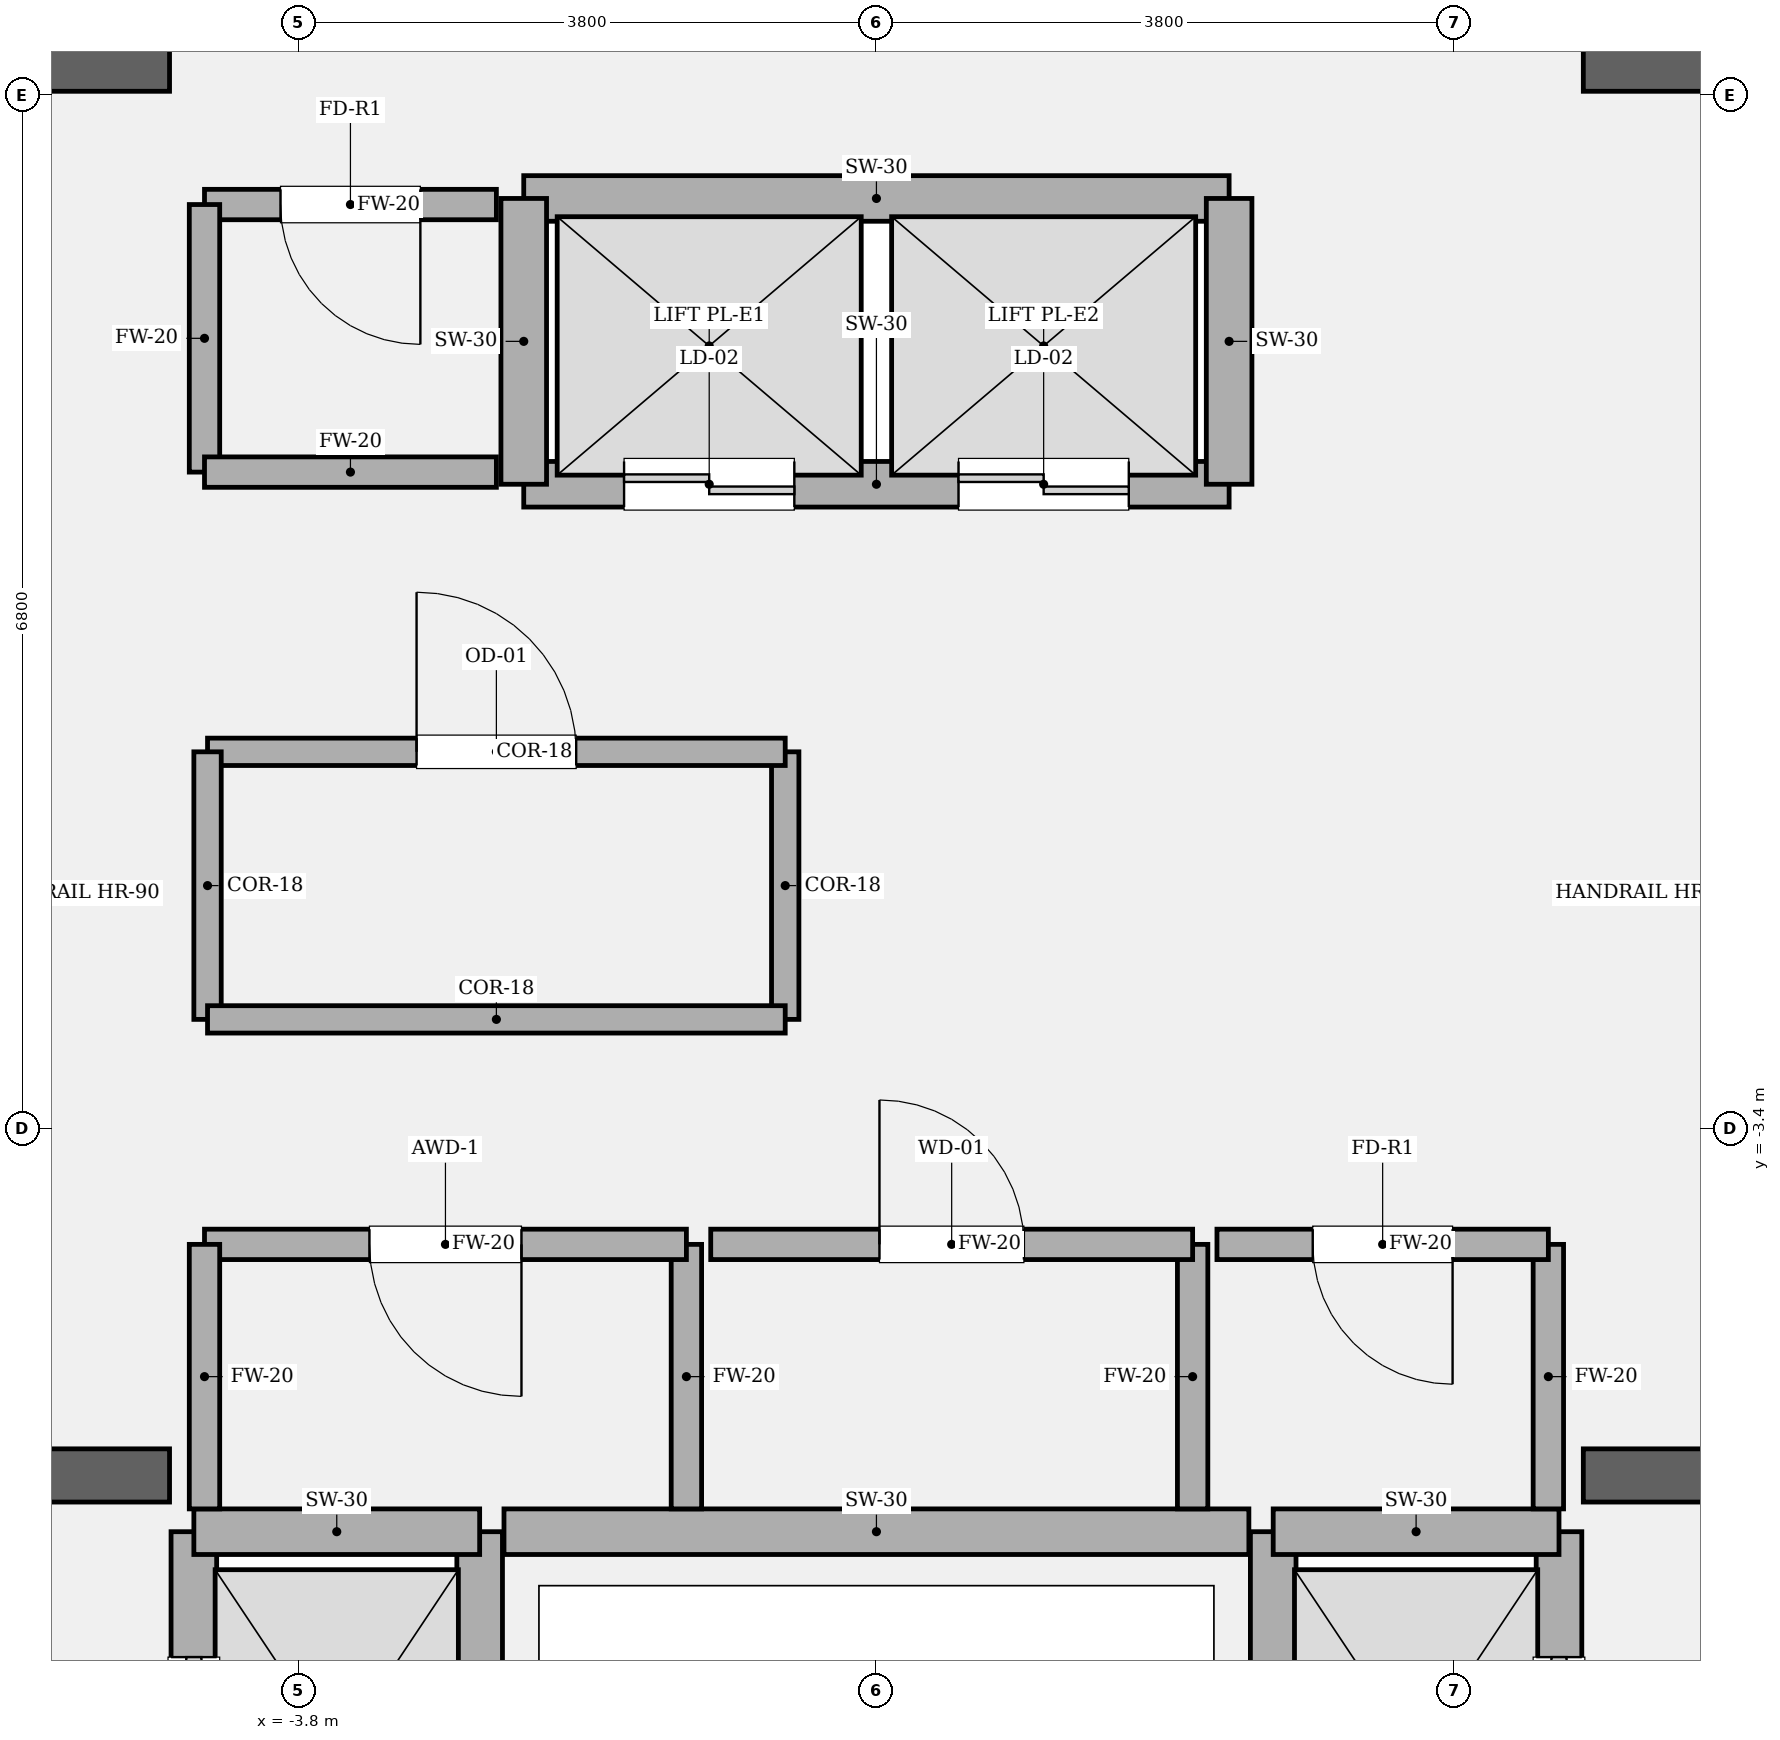
"""IFC4 building model, lengths in metres.
Left out: names, types, materials, properties, quantities, classifications, styles, units other than length and angle.
Written with IfcOpenShell. Run it as: python <this file> out.ifc"""

import sys

from ifc_helpers import new_model, si_unit, direction, frame, frame_2d, origin, place, context, subcontext, project, spatial, rectangle, extrude, element, fill, save


model = new_model("IFC4")
c1 = context("Model", 3, precision=1e-05, world=origin(), true_north=direction((0.0, 1.0)))
c2 = subcontext(c1, "Body", "Model", "MODEL_VIEW")
j1 = project(units=[si_unit("LENGTHUNIT", "METRE"), si_unit("PLANEANGLEUNIT", "RADIAN")], contexts=[c1])
p1 = place(None, origin())
s1 = spatial("IfcSite", under=j1, at=p1, CompositionType="ELEMENT")
p2 = place(p1, origin())
s2 = spatial("IfcBuilding", under=s1, at=p2, CompositionType="ELEMENT")
p3 = place(p2, frame((0.0, 0.0, 292.2)))
s3 = spatial("IfcBuildingStorey", under=s2, at=p3, CompositionType="ELEMENT", Elevation=292.2)
p4 = place(p3, frame((-9.925, -5.68, 0.0), z_axis=(0.0, 0.0, 1.0), x_axis=(1.0, 0.0, 0.0)))
e1 = element("IfcWall", 1, at=p4, inside=s3, PredefinedType="SOLIDWALL", context=c2, shape_type="SweptSolid", body=[
    extrude(rectangle(XDim=5.275, YDim=0.35, at=frame_2d((2.638, 0.0))), origin(), (0.0, 0.0, 1.0), 4.2),
])
p5 = place(p4, frame((1.385, 0.0, 0.0)))
e2 = element("IfcOpeningElement", 2, at=p5, cuts=e1, PredefinedType="OPENING", context=c2, shape_type="SweptSolid", body=[
    extrude(rectangle(XDim=1.18, YDim=2.2, at=frame_2d((0.59, 1.1))), frame((0.0, 0.185, 0.0), z_axis=(0.0, -1.0, 0.0), x_axis=(1.0, 0.0, 0.0)), (0.0, 0.0, 1.0), 0.37),
])
p6 = place(p3, frame((4.65, -5.68, 0.0), z_axis=(0.0, 0.0, 1.0), x_axis=(1.0, 0.0, 0.0)))
e3 = element("IfcWall", 3, at=p6, inside=s3, PredefinedType="SOLIDWALL", context=c2, shape_type="SweptSolid", body=[
    extrude(rectangle(XDim=5.275, YDim=0.35, at=frame_2d((2.638, 0.0))), origin(), (0.0, 0.0, 1.0), 4.2),
])
p7 = place(p6, frame((2.71, 0.0, 0.0)))
e4 = element("IfcOpeningElement", 4, at=p7, cuts=e3, PredefinedType="OPENING", context=c2, shape_type="SweptSolid", body=[
    extrude(rectangle(XDim=1.18, YDim=2.2, at=frame_2d((0.59, 1.1))), frame((0.0, 0.185, 0.0), z_axis=(0.0, -1.0, 0.0), x_axis=(1.0, 0.0, 0.0)), (0.0, 0.0, 1.0), 0.37),
])
for number, where, z_axis, x_axis in (
    (5, (-9.925, 3.6, 0.0), (0.0, 0.0, 1.0), (1.0, 0.0, 0.0)),
    (6, (4.65, 3.6, 0.0), (0.0, 0.0, 1.0), (1.0, 0.0, 0.0)),
):
    element("IfcWall", number, at=place(p3, frame(where, z_axis=z_axis, x_axis=x_axis)), inside=s3, PredefinedType="SOLIDWALL", context=c2, shape_type="SweptSolid", body=[
        extrude(rectangle(XDim=5.275, YDim=0.35, at=frame_2d((2.638, 0.0))), origin(), (0.0, 0.0, 1.0), 4.2),
    ])
p8 = place(p3, frame((-4.49, -8.82, 0.0), z_axis=(0.0, 0.0, 1.0), x_axis=(0.0, 1.0, 0.0)))
e7 = element("IfcWall", 7, at=p8, inside=s3, PredefinedType="SOLIDWALL", context=c2, shape_type="SweptSolid", body=[
    extrude(rectangle(XDim=2.77, YDim=0.3, at=frame_2d((1.385, 0.0))), origin(), (0.0, 0.0, 1.0), 4.0),
])
p9 = place(p8, frame((0.825, 0.0, 0.0)))
e8 = element("IfcOpeningElement", 8, at=p9, cuts=e7, PredefinedType="OPENING", context=c2, shape_type="SweptSolid", body=[
    extrude(rectangle(XDim=1.12, YDim=2.25, at=frame_2d((0.56, 1.125))), frame((0.0, 0.16, 0.0), z_axis=(0.0, -1.0, 0.0), x_axis=(1.0, 0.0, 0.0)), (0.0, 0.0, 1.0), 0.32),
])
p10 = place(p3, frame((-2.61, -8.82, 0.0), z_axis=(0.0, 0.0, 1.0), x_axis=(0.0, 1.0, 0.0)))
e9 = element("IfcWall", 9, at=p10, inside=s3, PredefinedType="SOLIDWALL", context=c2, shape_type="SweptSolid", body=[
    extrude(rectangle(XDim=2.77, YDim=0.3, at=frame_2d((1.385, 0.0))), origin(), (0.0, 0.0, 1.0), 4.0),
])
p11 = place(p3, frame((-4.49, -6.05, 0.0), z_axis=(0.0, 0.0, 1.0), x_axis=(1.0, 0.0, 0.0)))
e10 = element("IfcWall", 10, at=p11, inside=s3, PredefinedType="SOLIDWALL", context=c2, shape_type="SweptSolid", body=[
    extrude(rectangle(XDim=1.88, YDim=0.3, at=frame_2d((0.94, 0.0))), origin(), (0.0, 0.0, 1.0), 4.0),
])
p12 = place(p3, frame((4.49, -8.82, 0.0), z_axis=(0.0, 0.0, 1.0), x_axis=(0.0, 1.0, 0.0)))
e11 = element("IfcWall", 11, at=p12, inside=s3, PredefinedType="SOLIDWALL", context=c2, shape_type="SweptSolid", body=[
    extrude(rectangle(XDim=2.77, YDim=0.3, at=frame_2d((1.385, 0.0))), origin(), (0.0, 0.0, 1.0), 4.0),
])
p13 = place(p12, frame((0.825, 0.0, 0.0)))
e12 = element("IfcOpeningElement", 12, at=p13, cuts=e11, PredefinedType="OPENING", context=c2, shape_type="SweptSolid", body=[
    extrude(rectangle(XDim=1.12, YDim=2.25, at=frame_2d((0.56, 1.125))), frame((0.0, 0.16, 0.0), z_axis=(0.0, -1.0, 0.0), x_axis=(1.0, 0.0, 0.0)), (0.0, 0.0, 1.0), 0.32),
])
p14 = place(p3, frame((2.61, -8.82, 0.0), z_axis=(0.0, 0.0, 1.0), x_axis=(0.0, 1.0, 0.0)))
e13 = element("IfcWall", 13, at=p14, inside=s3, PredefinedType="SOLIDWALL", context=c2, shape_type="SweptSolid", body=[
    extrude(rectangle(XDim=2.77, YDim=0.3, at=frame_2d((1.385, 0.0))), origin(), (0.0, 0.0, 1.0), 4.0),
])
p15 = place(p3, frame((2.61, -6.05, 0.0), z_axis=(0.0, 0.0, 1.0), x_axis=(1.0, 0.0, 0.0)))
e14 = element("IfcWall", 14, at=p15, inside=s3, PredefinedType="SOLIDWALL", context=c2, shape_type="SweptSolid", body=[
    extrude(rectangle(XDim=1.88, YDim=0.3, at=frame_2d((0.94, 0.0))), origin(), (0.0, 0.0, 1.0), 4.0),
])
p16 = place(p3, frame((-2.32, 0.84, 0.0), z_axis=(0.0, 0.0, 1.0), x_axis=(1.0, 0.0, 0.0)))
e15 = element("IfcWall", 15, at=p16, inside=s3, PredefinedType="SOLIDWALL", context=c2, shape_type="SweptSolid", body=[
    extrude(rectangle(XDim=4.64, YDim=0.3, at=frame_2d((2.32, 0.0))), origin(), (0.0, 0.0, 1.0), 4.0),
])
p17 = place(p16, frame((0.66, 0.0, 0.0)))
e16 = element("IfcOpeningElement", 16, at=p17, cuts=e15, PredefinedType="OPENING", context=c2, shape_type="SweptSolid", body=[
    extrude(rectangle(XDim=1.12, YDim=2.25, at=frame_2d((0.56, 1.125))), frame((0.0, 0.16, 0.0), z_axis=(0.0, -1.0, 0.0), x_axis=(1.0, 0.0, 0.0)), (0.0, 0.0, 1.0), 0.32),
])
p18 = place(p16, frame((2.86, 0.0, 0.0)))
e17 = element("IfcOpeningElement", 17, at=p18, cuts=e15, PredefinedType="OPENING", context=c2, shape_type="SweptSolid", body=[
    extrude(rectangle(XDim=1.12, YDim=2.25, at=frame_2d((0.56, 1.125))), frame((0.0, 0.16, 0.0), z_axis=(0.0, -1.0, 0.0), x_axis=(1.0, 0.0, 0.0)), (0.0, 0.0, 1.0), 0.32),
])
p19 = place(p3, frame((-2.32, 2.72, 0.0), z_axis=(0.0, 0.0, 1.0), x_axis=(1.0, 0.0, 0.0)))
e18 = element("IfcWall", 18, at=p19, inside=s3, PredefinedType="SOLIDWALL", context=c2, shape_type="SweptSolid", body=[
    extrude(rectangle(XDim=4.64, YDim=0.3, at=frame_2d((2.32, 0.0))), origin(), (0.0, 0.0, 1.0), 4.0),
])
for number, where, z_axis, x_axis in (
    (19, (-2.32, 0.84, 0.0), (0.0, 0.0, 1.0), (0.0, 1.0, 0.0)),
    (20, (2.32, 0.84, 0.0), (0.0, 0.0, 1.0), (0.0, 1.0, 0.0)),
):
    element("IfcWall", number, at=place(p3, frame(where, z_axis=z_axis, x_axis=x_axis)), inside=s3, PredefinedType="SOLIDWALL", context=c2, shape_type="SweptSolid", body=[
        extrude(rectangle(XDim=1.88, YDim=0.3, at=frame_2d((0.94, 0.0))), origin(), (0.0, 0.0, 1.0), 4.0),
    ])
p20 = place(p3, frame((-2.45, -6.05, 0.0), z_axis=(0.0, 0.0, 1.0), x_axis=(1.0, 0.0, 0.0)))
e21 = element("IfcWall", 21, at=p20, inside=s3, PredefinedType="SOLIDWALL", context=c2, shape_type="SweptSolid", body=[
    extrude(rectangle(XDim=4.9, YDim=0.3, at=frame_2d((2.45, 0.0))), origin(), (0.0, 0.0, 1.0), 4.0),
])
p21 = place(p3, frame((-1.25, -5.9, 0.0), z_axis=(0.0, 0.0, 1.0), x_axis=(0.0, 1.0, 0.0)))
e22 = element("IfcWall", 22, at=p21, inside=s3, PredefinedType="SOLIDWALL", context=c2, shape_type="SweptSolid", body=[
    extrude(rectangle(XDim=1.74, YDim=0.2, at=frame_2d((0.87, 0.0))), origin(), (0.0, 0.0, 1.0), 4.0),
])
p22 = place(p3, frame((-1.25, -4.16, 0.0), z_axis=(0.0, 0.0, 1.0), x_axis=(-1.0, 0.0, 0.0)))
e23 = element("IfcWall", 23, at=p22, inside=s3, PredefinedType="SOLIDWALL", context=c2, shape_type="SweptSolid", body=[
    extrude(rectangle(XDim=3.17, YDim=0.2, at=frame_2d((1.585, 0.0))), origin(), (0.0, 0.0, 1.0), 4.0),
])
p23 = place(p22, frame((1.085, 0.0, 0.0)))
e24 = element("IfcOpeningElement", 24, at=p23, cuts=e23, PredefinedType="OPENING", context=c2, shape_type="SweptSolid", body=[
    extrude(rectangle(XDim=1.0, YDim=2.15, at=frame_2d((0.5, 1.075))), frame((0.0, 0.11, 0.0), z_axis=(0.0, -1.0, 0.0), x_axis=(1.0, 0.0, 0.0)), (0.0, 0.0, 1.0), 0.22),
])
for number, where, z_axis, x_axis in (
    (25, (-4.42, -4.16, 0.0), (0.0, 0.0, 1.0), (0.0, -1.0, 0.0)),
    (26, (2.08, -5.9, 0.0), (0.0, 0.0, 1.0), (0.0, 1.0, 0.0)),
):
    element("IfcWall", number, at=place(p3, frame(where, z_axis=z_axis, x_axis=x_axis)), inside=s3, PredefinedType="SOLIDWALL", context=c2, shape_type="SweptSolid", body=[
        extrude(rectangle(XDim=1.74, YDim=0.2, at=frame_2d((0.87, 0.0))), origin(), (0.0, 0.0, 1.0), 4.0),
    ])
p24 = place(p3, frame((2.08, -4.16, 0.0), z_axis=(0.0, 0.0, 1.0), x_axis=(-1.0, 0.0, 0.0)))
e27 = element("IfcWall", 27, at=p24, inside=s3, PredefinedType="SOLIDWALL", context=c2, shape_type="SweptSolid", body=[
    extrude(rectangle(XDim=3.17, YDim=0.2, at=frame_2d((1.585, 0.0))), origin(), (0.0, 0.0, 1.0), 4.0),
])
p25 = place(p24, frame((1.11, 0.0, 0.0)))
e28 = element("IfcOpeningElement", 28, at=p25, cuts=e27, PredefinedType="OPENING", context=c2, shape_type="SweptSolid", body=[
    extrude(rectangle(XDim=0.95, YDim=2.15, at=frame_2d((0.475, 1.075))), frame((0.0, 0.11, 0.0), z_axis=(0.0, -1.0, 0.0), x_axis=(1.0, 0.0, 0.0)), (0.0, 0.0, 1.0), 0.22),
])
p26 = place(p3, frame((4.42, -5.9, 0.0), z_axis=(0.0, 0.0, 1.0), x_axis=(0.0, 1.0, 0.0)))
e29 = element("IfcWall", 29, at=p26, inside=s3, PredefinedType="SOLIDWALL", context=c2, shape_type="SweptSolid", body=[
    extrude(rectangle(XDim=1.74, YDim=0.2, at=frame_2d((0.87, 0.0))), origin(), (0.0, 0.0, 1.0), 4.0),
])
p27 = place(p3, frame((4.42, -4.16, 0.0), z_axis=(0.0, 0.0, 1.0), x_axis=(-1.0, 0.0, 0.0)))
e30 = element("IfcWall", 30, at=p27, inside=s3, PredefinedType="SOLIDWALL", context=c2, shape_type="SweptSolid", body=[
    extrude(rectangle(XDim=2.18, YDim=0.2, at=frame_2d((1.09, 0.0))), origin(), (0.0, 0.0, 1.0), 4.0),
])
p28 = place(p27, frame((0.63, 0.0, 0.0)))
e31 = element("IfcOpeningElement", 31, at=p28, cuts=e30, PredefinedType="OPENING", context=c2, shape_type="SweptSolid", body=[
    extrude(rectangle(XDim=0.92, YDim=2.1, at=frame_2d((0.46, 1.05))), frame((0.0, 0.11, 0.0), z_axis=(0.0, -1.0, 0.0), x_axis=(1.0, 0.0, 0.0)), (0.0, 0.0, 1.0), 0.22),
])
p29 = place(p3, frame((-0.6, -2.68, 0.0), z_axis=(0.0, 0.0, 1.0), x_axis=(0.0, 1.0, 0.0)))
e32 = element("IfcWall", 32, at=p29, inside=s3, PredefinedType="PARTITIONING", context=c2, shape_type="SweptSolid", body=[
    extrude(rectangle(XDim=1.76, YDim=0.18, at=frame_2d((0.88, 0.0))), origin(), (0.0, 0.0, 1.0), 4.0),
])
p30 = place(p3, frame((-0.6, -0.92, 0.0), z_axis=(0.0, 0.0, 1.0), x_axis=(-1.0, 0.0, 0.0)))
e33 = element("IfcWall", 33, at=p30, inside=s3, PredefinedType="PARTITIONING", context=c2, shape_type="SweptSolid", body=[
    extrude(rectangle(XDim=3.8, YDim=0.18, at=frame_2d((1.9, 0.0))), origin(), (0.0, 0.0, 1.0), 4.0),
])
p31 = place(p30, frame((1.375, 0.0, 0.0)))
e34 = element("IfcOpeningElement", 34, at=p31, cuts=e33, PredefinedType="OPENING", context=c2, shape_type="SweptSolid", body=[
    extrude(rectangle(XDim=1.05, YDim=2.2, at=frame_2d((0.525, 1.1))), frame((0.0, 0.1, 0.0), z_axis=(0.0, -1.0, 0.0), x_axis=(1.0, 0.0, 0.0)), (0.0, 0.0, 1.0), 0.2),
])
p32 = place(p3, frame((-4.4, -0.92, 0.0), z_axis=(0.0, 0.0, 1.0), x_axis=(0.0, -1.0, 0.0)))
e35 = element("IfcWall", 35, at=p32, inside=s3, PredefinedType="PARTITIONING", context=c2, shape_type="SweptSolid", body=[
    extrude(rectangle(XDim=1.76, YDim=0.18, at=frame_2d((0.88, 0.0))), origin(), (0.0, 0.0, 1.0), 4.0),
])
p33 = place(p3, frame((-4.4, -2.68, 0.0), z_axis=(0.0, 0.0, 1.0), x_axis=(1.0, 0.0, 0.0)))
e36 = element("IfcWall", 36, at=p33, inside=s3, PredefinedType="PARTITIONING", context=c2, shape_type="SweptSolid", body=[
    extrude(rectangle(XDim=3.8, YDim=0.18, at=frame_2d((1.9, 0.0))), origin(), (0.0, 0.0, 1.0), 4.0),
])
p34 = place(p3, frame((-2.5, 2.68, 0.0), z_axis=(0.0, 0.0, 1.0), x_axis=(-1.0, 0.0, 0.0)))
e37 = element("IfcWall", 37, at=p34, inside=s3, PredefinedType="SOLIDWALL", context=c2, shape_type="SweptSolid", body=[
    extrude(rectangle(XDim=1.92, YDim=0.2, at=frame_2d((0.96, 0.0))), origin(), (0.0, 0.0, 1.0), 4.0),
])
p35 = place(p34, frame((0.5, 0.0, 0.0)))
e38 = element("IfcOpeningElement", 38, at=p35, cuts=e37, PredefinedType="OPENING", context=c2, shape_type="SweptSolid", body=[
    extrude(rectangle(XDim=0.92, YDim=2.1, at=frame_2d((0.46, 1.05))), frame((0.0, 0.11, 0.0), z_axis=(0.0, -1.0, 0.0), x_axis=(1.0, 0.0, 0.0)), (0.0, 0.0, 1.0), 0.22),
])
p36 = place(p3, frame((-4.42, 2.68, 0.0), z_axis=(0.0, 0.0, 1.0), x_axis=(0.0, -1.0, 0.0)))
e39 = element("IfcWall", 39, at=p36, inside=s3, PredefinedType="SOLIDWALL", context=c2, shape_type="SweptSolid", body=[
    extrude(rectangle(XDim=1.76, YDim=0.2, at=frame_2d((0.88, 0.0))), origin(), (0.0, 0.0, 1.0), 4.0),
])
p37 = place(p3, frame((-4.42, 0.92, 0.0), z_axis=(0.0, 0.0, 1.0), x_axis=(1.0, 0.0, 0.0)))
e40 = element("IfcWall", 40, at=p37, inside=s3, PredefinedType="SOLIDWALL", context=c2, shape_type="SweptSolid", body=[
    extrude(rectangle(XDim=1.92, YDim=0.2, at=frame_2d((0.96, 0.0))), origin(), (0.0, 0.0, 1.0), 4.0),
])
p38 = place(p9, origin())
e41 = element("IfcDoor", 41, at=p38, inside=s3, OperationType="SLIDING_TO_LEFT", PredefinedType="DOOR", context=c2, shape_type="SweptSolid", body=[
    extrude(rectangle(XDim=1.12, YDim=2.25, at=frame_2d((0.56, 1.125))), frame((0.0, 0.025, 0.0), z_axis=(0.0, -1.0, 0.0), x_axis=(1.0, 0.0, 0.0)), (0.0, 0.0, 1.0), 0.05),
])
fill(e8, e41)
p39 = place(p13, origin())
e42 = element("IfcDoor", 42, at=p39, inside=s3, OperationType="SLIDING_TO_RIGHT", PredefinedType="DOOR", context=c2, shape_type="SweptSolid", body=[
    extrude(rectangle(XDim=1.12, YDim=2.25, at=frame_2d((0.56, 1.125))), frame((0.0, 0.025, 0.0), z_axis=(0.0, -1.0, 0.0), x_axis=(1.0, 0.0, 0.0)), (0.0, 0.0, 1.0), 0.05),
])
fill(e12, e42)
p40 = place(p17, origin())
e43 = element("IfcDoor", 43, at=p40, inside=s3, OperationType="DOUBLE_DOOR_SLIDING", PredefinedType="DOOR", context=c2, shape_type="SweptSolid", body=[
    extrude(rectangle(XDim=1.12, YDim=2.25, at=frame_2d((0.56, 1.125))), frame((0.0, 0.025, 0.0), z_axis=(0.0, -1.0, 0.0), x_axis=(1.0, 0.0, 0.0)), (0.0, 0.0, 1.0), 0.05),
])
fill(e16, e43)
p41 = place(p18, origin())
e44 = element("IfcDoor", 44, at=p41, inside=s3, OperationType="DOUBLE_DOOR_SLIDING", PredefinedType="DOOR", context=c2, shape_type="SweptSolid", body=[
    extrude(rectangle(XDim=1.12, YDim=2.25, at=frame_2d((0.56, 1.125))), frame((0.0, 0.025, 0.0), z_axis=(0.0, -1.0, 0.0), x_axis=(1.0, 0.0, 0.0)), (0.0, 0.0, 1.0), 0.05),
])
fill(e17, e44)
p42 = place(p23, origin())
e45 = element("IfcDoor", 45, at=p42, inside=s3, OperationType="SINGLE_SWING_LEFT", PredefinedType="DOOR", context=c2, shape_type="SweptSolid", body=[
    extrude(rectangle(XDim=1.0, YDim=2.15, at=frame_2d((0.5, 1.075))), frame((0.0, 0.025, 0.0), z_axis=(0.0, -1.0, 0.0), x_axis=(1.0, 0.0, 0.0)), (0.0, 0.0, 1.0), 0.05),
])
fill(e24, e45)
p43 = place(p25, origin())
e46 = element("IfcDoor", 46, at=p43, inside=s3, OperationType="SINGLE_SWING_RIGHT", PredefinedType="DOOR", context=c2, shape_type="SweptSolid", body=[
    extrude(rectangle(XDim=0.95, YDim=2.15, at=frame_2d((0.475, 1.075))), frame((0.0, 0.025, 0.0), z_axis=(0.0, -1.0, 0.0), x_axis=(1.0, 0.0, 0.0)), (0.0, 0.0, 1.0), 0.05),
])
fill(e28, e46)
p44 = place(p28, origin())
e47 = element("IfcDoor", 47, at=p44, inside=s3, OperationType="SINGLE_SWING_LEFT", PredefinedType="DOOR", context=c2, shape_type="SweptSolid", body=[
    extrude(rectangle(XDim=0.92, YDim=2.1, at=frame_2d((0.46, 1.05))), frame((0.0, 0.025, 0.0), z_axis=(0.0, -1.0, 0.0), x_axis=(1.0, 0.0, 0.0)), (0.0, 0.0, 1.0), 0.05),
])
fill(e31, e47)
p45 = place(p31, origin())
e48 = element("IfcDoor", 48, at=p45, inside=s3, OperationType="SINGLE_SWING_RIGHT", PredefinedType="DOOR", context=c2, shape_type="SweptSolid", body=[
    extrude(rectangle(XDim=1.05, YDim=2.2, at=frame_2d((0.525, 1.1))), frame((0.0, 0.025, 0.0), z_axis=(0.0, -1.0, 0.0), x_axis=(1.0, 0.0, 0.0)), (0.0, 0.0, 1.0), 0.05),
])
fill(e34, e48)
p46 = place(p35, origin())
e49 = element("IfcDoor", 49, at=p46, inside=s3, OperationType="SINGLE_SWING_LEFT", PredefinedType="DOOR", context=c2, shape_type="SweptSolid", body=[
    extrude(rectangle(XDim=0.92, YDim=2.1, at=frame_2d((0.46, 1.05))), frame((0.0, 0.025, 0.0), z_axis=(0.0, -1.0, 0.0), x_axis=(1.0, 0.0, 0.0)), (0.0, 0.0, 1.0), 0.05),
])
fill(e38, e49)
save(model, sys.argv[1])
